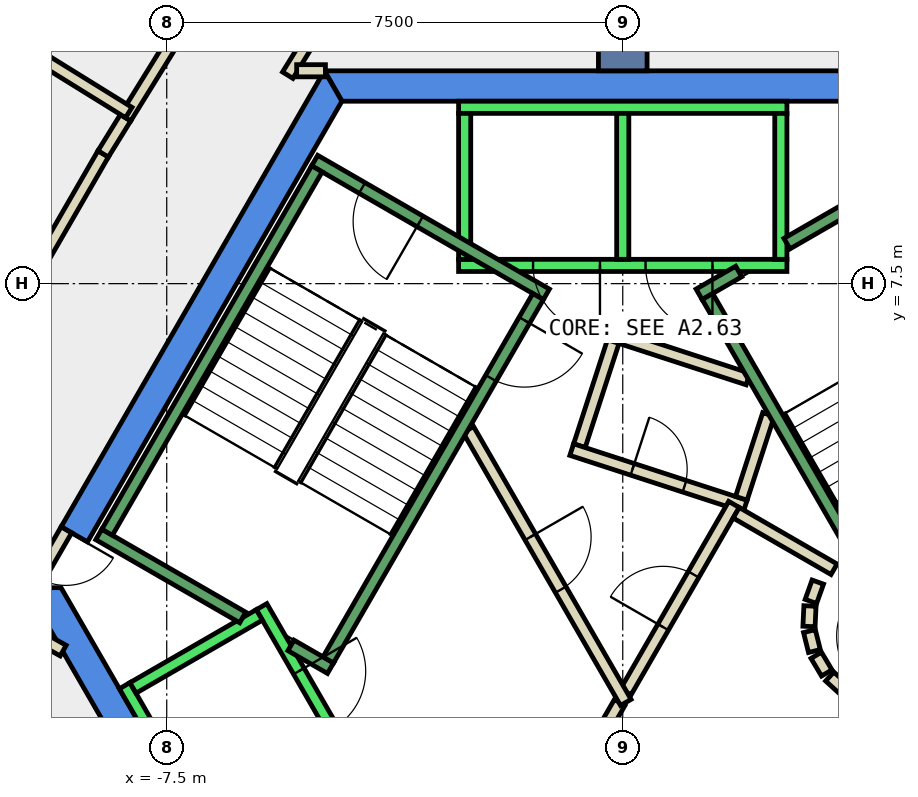
"""IFC4 building model, lengths in metres.
Left out: names, types, materials, properties, quantities, classifications, styles, units other than length and angle.
Written with IfcOpenShell. Run it as: python <this file> out.ifc"""

import sys

from ifc_helpers import new_model, si_unit, direction, frame, frame_2d, origin, place, context, subcontext, project, spatial, polyline, rectangle, outline, extrude, element, fill, save


model = new_model("IFC4")
c1 = context("Model", 3, precision=1e-05, world=origin(), true_north=direction((0.0, 1.0)))
c2 = subcontext(c1, "Body", "Model", "MODEL_VIEW")
j1 = project(units=[si_unit("LENGTHUNIT", "METRE"), si_unit("PLANEANGLEUNIT", "RADIAN")], contexts=[c1])
p1 = place(None, origin())
s1 = spatial("IfcSite", under=j1, at=p1, CompositionType="ELEMENT")
p2 = place(p1, origin())
s2 = spatial("IfcBuilding", under=s1, at=p2, CompositionType="ELEMENT")
p3 = place(p2, frame((0.0, 0.0, 297.2)))
s3 = spatial("IfcBuildingStorey", under=s2, at=p3, CompositionType="ELEMENT", Elevation=297.2)
p4 = place(p3, frame((0.0, 0.0, -0.34)))
e1 = element("IfcWall", 1, at=p4, inside=s3, PredefinedType="SHEAR", context=c2, shape_type="SweptSolid", body=[
    extrude(outline(polyline([(4.907, 11.0), (-4.907, 11.0), (-4.619, 10.5), (4.619, 10.5), (4.907, 11.0)])), origin(), (0.0, 0.0, 1.0), 3.6),
])
p5 = place(p3, frame((0.0, 0.0, -0.34)))
e2 = element("IfcWall", 2, at=p5, inside=s3, PredefinedType="SHEAR", context=c2, shape_type="SweptSolid", body=[
    extrude(outline(polyline([(-9.236, 3.502), (-8.803, 3.253), (-4.619, 10.5), (-4.907, 11.0), (-9.236, 3.502)])), origin(), (0.0, 0.0, 1.0), 3.6),
])
p6 = place(p3, frame((0.0, 0.0, -0.34)))
e3 = element("IfcWall", 3, at=p6, inside=s3, PredefinedType="SHEAR", context=c2, shape_type="SweptSolid", body=[
    extrude(outline(polyline([(-9.815, 2.5), (-4.907, -6.0), (-4.619, -5.5), (-9.238, 2.5), (-9.815, 2.5)])), origin(), (0.0, 0.0, 1.0), 3.6),
])
p7 = place(p3, frame((0.0, 11.0, -0.34), z_axis=(0.0, 0.0, 1.0), x_axis=(0.0, 1.0, 0.0)))
e4 = element("IfcWall", 4, at=p7, inside=s3, PredefinedType="SHEAR", context=c2, shape_type="SweptSolid", body=[
    extrude(rectangle(XDim=9.0, YDim=0.8, at=frame_2d((4.5, 0.0))), origin(), (0.0, 0.0, 1.0), 3.6),
])
p8 = place(p3, frame((2.06, 5.931, 0.0), z_axis=(0.0, 0.0, 1.0), x_axis=(-0.95092855133, 0.309410552932, 0.0)))
e5 = element("IfcWall", 5, at=p8, inside=s3, PredefinedType="PARTITIONING", context=c2, shape_type="SweptSolid", body=[
    extrude(rectangle(XDim=2.399, YDim=0.2, at=frame_2d((1.199, 0.0))), origin(), (0.0, 0.0, 1.0), 3.26),
])
p9 = place(p3, frame((-0.157, 6.547, 0.0), z_axis=(0.0, 0.0, 1.0), x_axis=(-0.308813127339, -0.951122732555, 0.0)))
e6 = element("IfcWall", 6, at=p9, inside=s3, PredefinedType="PARTITIONING", context=c2, shape_type="SweptSolid", body=[
    extrude(rectangle(XDim=1.8, YDim=0.2, at=frame_2d((0.9, 0.0))), origin(), (0.0, 0.0, 1.0), 3.26),
])
p10 = place(p3, frame((-0.839, 4.771, 0.0), z_axis=(0.0, 0.0, 1.0), x_axis=(0.950961084355, -0.309310549515, 0.0)))
e7 = element("IfcWall", 7, at=p10, inside=s3, PredefinedType="PARTITIONING", context=c2, shape_type="SweptSolid", body=[
    extrude(rectangle(XDim=3.0, YDim=0.2, at=frame_2d((1.5, 0.0))), origin(), (0.0, 0.0, 1.0), 3.26),
])
p11 = place(p10, frame((1.05, 0.0, 0.0)))
e8 = element("IfcOpeningElement", 8, at=p11, cuts=e7, PredefinedType="OPENING", context=c2, shape_type="SweptSolid", body=[
    extrude(rectangle(XDim=0.9, YDim=2.1, at=frame_2d((0.45, 1.05))), frame((0.0, 0.11, 0.0), z_axis=(0.0, -1.0, 0.0), x_axis=(1.0, 0.0, 0.0)), (0.0, 0.0, 1.0), 0.22),
])
p12 = place(p3, frame((1.95, 3.97, 0.0), z_axis=(0.0, 0.0, 1.0), x_axis=(0.308583003896, 0.951197418892, 0.0)))
e9 = element("IfcWall", 9, at=p12, inside=s3, PredefinedType="PARTITIONING", context=c2, shape_type="SweptSolid", body=[
    extrude(rectangle(XDim=1.449, YDim=0.2, at=frame_2d((0.724, 0.0))), origin(), (0.0, 0.0, 1.0), 3.26),
])
p13 = place(p3, frame((-2.969, 15.033, 0.0), z_axis=(0.0, 0.0, 1.0), x_axis=(-0.526330241425, -0.85028023437, 0.0)))
e10 = element("IfcWall", 10, at=p13, inside=s3, PredefinedType="PARTITIONING", context=c2, shape_type="SweptSolid", body=[
    extrude(rectangle(XDim=4.828, YDim=0.2, at=frame_2d((2.414, 0.0))), origin(), (0.0, 0.0, 1.0), 3.26),
])
p14 = place(p13, frame((1.514, 0.0, 0.0)))
e11 = element("IfcOpeningElement", 11, at=p14, cuts=e10, PredefinedType="OPENING", context=c2, shape_type="SweptSolid", body=[
    extrude(rectangle(XDim=1.8, YDim=2.1, at=frame_2d((0.9, 1.05))), frame((0.0, 0.11, 0.0), z_axis=(0.0, -1.0, 0.0), x_axis=(1.0, 0.0, 0.0)), (0.0, 0.0, 1.0), 0.22),
])
p15 = place(p3, frame((-5.363, 11.001, 0.0), z_axis=(0.0, 0.0, 1.0), x_axis=(1.0, 0.0, 0.0)))
e12 = element("IfcWall", 12, at=p15, inside=s3, PredefinedType="PARTITIONING", context=c2, shape_type="SweptSolid", body=[
    extrude(rectangle(XDim=0.473, YDim=0.2, at=frame_2d((0.237, 0.0))), origin(), (0.0, 0.0, 1.0), 3.26),
])
p16 = place(p3, frame((-9.203, 1.465, 0.0), z_axis=(0.0, 0.0, 1.0), x_axis=(-0.872243753731, 0.489071399775, 0.0)))
e13 = element("IfcWall", 13, at=p16, inside=s3, PredefinedType="PARTITIONING", context=c2, shape_type="SweptSolid", body=[
    extrude(rectangle(XDim=1.715, YDim=0.2, at=frame_2d((0.858, 0.0))), origin(), (0.0, 0.0, 1.0), 3.26),
])
p17 = place(p3, frame((-10.543, 6.174, 0.0), z_axis=(0.0, 0.0, 1.0), x_axis=(0.50008212199, 0.86597798544, 0.0)))
e14 = element("IfcWall", 14, at=p17, inside=s3, PredefinedType="PARTITIONING", context=c2, shape_type="SweptSolid", body=[
    extrude(rectangle(XDim=3.995, YDim=0.2, at=frame_2d((1.998, 0.0))), origin(), (0.0, 0.0, 1.0), 3.26),
])
p18 = place(p3, frame((-8.545, 9.634, 0.0), z_axis=(0.0, 0.0, 1.0), x_axis=(0.52594604986, 0.85051793199, 0.0)))
e15 = element("IfcWall", 15, at=p18, inside=s3, PredefinedType="PARTITIONING", context=c2, shape_type="SweptSolid", body=[
    extrude(rectangle(XDim=0.699, YDim=0.2, at=frame_2d((0.35, 0.0))), origin(), (0.0, 0.0, 1.0), 3.26),
])
p19 = place(p3, frame((-8.177, 10.229, 0.0), z_axis=(0.0, 0.0, 1.0), x_axis=(0.526504295939, 0.850172468595, 0.0)))
e16 = element("IfcWall", 16, at=p19, inside=s3, PredefinedType="PARTITIONING", context=c2, shape_type="SweptSolid", body=[
    extrude(rectangle(XDim=3.2, YDim=0.2, at=frame_2d((1.6, 0.0))), origin(), (0.0, 0.0, 1.0), 3.26),
])
p20 = place(p3, frame((-0.982, -1.0, 0.0), z_axis=(0.0, 0.0, 1.0), x_axis=(0.50024047865, 0.865886518847, 0.0)))
e17 = element("IfcWall", 17, at=p20, inside=s3, PredefinedType="PARTITIONING", context=c2, shape_type="SweptSolid", body=[
    extrude(rectangle(XDim=1.863, YDim=0.2, at=frame_2d((0.931, 0.0))), origin(), (0.0, 0.0, 1.0), 3.26),
])
p21 = place(p3, frame((0.05, 0.787, 0.0), z_axis=(0.0, 0.0, 1.0), x_axis=(0.499954076797, 0.866051915934, 0.0)))
e18 = element("IfcWall", 18, at=p21, inside=s3, PredefinedType="PARTITIONING", context=c2, shape_type="SweptSolid", body=[
    extrude(rectangle(XDim=3.558, YDim=0.2, at=frame_2d((1.779, 0.0))), origin(), (0.0, 0.0, 1.0), 3.26),
])
p22 = place(p21, frame((1.229, 0.0, 0.0)))
e19 = element("IfcOpeningElement", 19, at=p22, cuts=e18, PredefinedType="OPENING", context=c2, shape_type="SweptSolid", body=[
    extrude(rectangle(XDim=1.0, YDim=2.1, at=frame_2d((0.5, 1.05))), frame((0.0, 0.11, 0.0), z_axis=(0.0, -1.0, 0.0), x_axis=(1.0, 0.0, 0.0)), (0.0, 0.0, 1.0), 0.22),
])
p23 = place(p3, frame((1.866, 3.732, 0.0), z_axis=(0.0, 0.0, 1.0), x_axis=(0.866043361281, -0.499968895414, 0.0)))
e20 = element("IfcWall", 20, at=p23, inside=s3, PredefinedType="PARTITIONING", context=c2, shape_type="SweptSolid", body=[
    extrude(rectangle(XDim=1.858, YDim=0.2, at=frame_2d((0.929, 0.0))), origin(), (0.0, 0.0, 1.0), 3.26),
])
p24 = place(p3, frame((3.208, 2.592, 0.0), z_axis=(0.0, 0.0, 1.0), x_axis=(-0.337388820924, -0.941365382578, 0.0)))
e21 = element("IfcWall", 21, at=p24, inside=s3, PredefinedType="PARTITIONING", context=c2, shape_type="SweptSolid", body=[
    extrude(rectangle(XDim=0.338, YDim=0.2, at=frame_2d((0.169, 0.0))), origin(), (0.0, 0.0, 1.0), 3.26),
])
p25 = place(p3, frame((3.079, 2.199, 0.0), z_axis=(0.0, 0.0, 1.0), x_axis=(-0.047771483479, -0.998858290933, 0.0)))
e22 = element("IfcWall", 22, at=p25, inside=s3, PredefinedType="PARTITIONING", context=c2, shape_type="SweptSolid", body=[
    extrude(rectangle(XDim=0.337, YDim=0.2, at=frame_2d((0.169, 0.0))), origin(), (0.0, 0.0, 1.0), 3.26),
])
p26 = place(p3, frame((3.07, 1.786, 0.0), z_axis=(0.0, 0.0, 1.0), x_axis=(0.242705583207, -0.970099994784, 0.0)))
e23 = element("IfcWall", 23, at=p26, inside=s3, PredefinedType="PARTITIONING", context=c2, shape_type="SweptSolid", body=[
    extrude(rectangle(XDim=0.338, YDim=0.2, at=frame_2d((0.169, 0.0))), origin(), (0.0, 0.0, 1.0), 3.26),
])
for number, where, z_axis, x_axis in (
    (24, (3.182, 1.388, 0.0), (0.0, 0.0, 1.0), (0.512, -0.859, 0.0)),
    (25, (3.404, 1.039, 0.0), (0.0, 0.0, 1.0), (0.74, -0.672, 0.0)),
):
    element("IfcWall", number, at=place(p3, frame(where, z_axis=z_axis, x_axis=x_axis)), inside=s3, PredefinedType="PARTITIONING", context=c2, shape_type="SweptSolid", body=[
        extrude(rectangle(XDim=0.338, YDim=0.2, at=frame_2d((0.169, 0.0))), origin(), (0.0, 0.0, 1.0), 3.26),
    ])
p27 = place(p3, frame((-2.54, 5.1, 0.0), z_axis=(0.0, 0.0, 1.0), x_axis=(0.499925051871, -0.866068670783, 0.0)))
e26 = element("IfcWall", 26, at=p27, inside=s3, PredefinedType="PARTITIONING", context=c2, shape_type="SweptSolid", body=[
    extrude(rectangle(XDim=5.181, YDim=0.2, at=frame_2d((2.59, 0.0))), origin(), (0.0, 0.0, 1.0), 3.26),
])
p28 = place(p27, frame((2.04, 0.0, 0.0)))
e27 = element("IfcOpeningElement", 27, at=p28, cuts=e26, PredefinedType="OPENING", context=c2, shape_type="SweptSolid", body=[
    extrude(rectangle(XDim=1.0, YDim=2.1, at=frame_2d((0.5, 1.05))), frame((0.0, 0.11, 0.0), z_axis=(0.0, -1.0, 0.0), x_axis=(1.0, 0.0, 0.0)), (0.0, 0.0, 1.0), 0.22),
])
p29 = place(p3, frame((-10.42, 11.736, 0.0), z_axis=(0.0, 0.0, 1.0), x_axis=(0.850124477172, -0.52658178217, 0.0)))
e28 = element("IfcWall", 28, at=p29, inside=s3, PredefinedType="PARTITIONING", context=c2, shape_type="SweptSolid", body=[
    extrude(rectangle(XDim=2.701, YDim=0.2, at=frame_2d((1.35, 0.0))), origin(), (0.0, 0.0, 1.0), 3.26),
])
p30 = place(p3, frame((-9.15, 3.452, 0.0), z_axis=(0.0, 0.0, 1.0), x_axis=(-0.500079945886, -0.865979242085, 0.0)))
e29 = element("IfcWall", 29, at=p30, inside=s3, PredefinedType="PARTITIONING", context=c2, shape_type="SweptSolid", body=[
    extrude(rectangle(XDim=0.926, YDim=0.2, at=frame_2d((0.463, 0.0))), origin(), (0.0, 0.0, 1.0), 2.4),
])
p31 = place(p30, frame((0.017, 0.0, 0.0)))
e30 = element("IfcOpeningElement", 30, at=p31, cuts=e29, PredefinedType="OPENING", context=c2, shape_type="SweptSolid", body=[
    extrude(rectangle(XDim=0.9, YDim=2.1, at=frame_2d((0.45, 1.05))), frame((0.0, 0.11, 0.0), z_axis=(0.0, -1.0, 0.0), x_axis=(1.0, 0.0, 0.0)), (0.0, 0.0, 1.0), 0.22),
])
p32 = place(p3, frame((4.822, 11.156, 0.0), z_axis=(0.0, 0.0, 1.0), x_axis=(-0.429057973289, 0.903276953961, 0.0)))
e31 = element("IfcWall", 31, at=p32, inside=s3, PredefinedType="PARTITIONING", context=c2, shape_type="SweptSolid", body=[
    extrude(rectangle(XDim=4.298, YDim=0.2, at=frame_2d((2.149, 0.0))), origin(), (0.0, 0.0, 1.0), 3.26),
])
p33 = place(p3, frame((2.7, 7.8, 0.0), z_axis=(0.0, 0.0, 1.0), x_axis=(-1.0, 0.0, 0.0)))
e32 = element("IfcWall", 32, at=p33, inside=s3, PredefinedType="STANDARD", context=c2, shape_type="SweptSolid", body=[
    extrude(rectangle(XDim=5.4, YDim=0.2, at=frame_2d((2.7, 0.0))), origin(), (0.0, 0.0, 1.0), 3.26),
])
p34 = place(p33, frame((1.225, 0.0, 0.0)))
e33 = element("IfcOpeningElement", 33, at=p34, cuts=e32, PredefinedType="OPENING", context=c2, shape_type="SweptSolid", body=[
    extrude(rectangle(XDim=1.1, YDim=2.1, at=frame_2d((0.55, 1.05))), frame((0.0, 0.11, 0.0), z_axis=(0.0, -1.0, 0.0), x_axis=(1.0, 0.0, 0.0)), (0.0, 0.0, 1.0), 0.22),
])
p35 = place(p33, frame((3.075, 0.0, 0.0)))
e34 = element("IfcOpeningElement", 34, at=p35, cuts=e32, PredefinedType="OPENING", context=c2, shape_type="SweptSolid", body=[
    extrude(rectangle(XDim=1.1, YDim=2.1, at=frame_2d((0.55, 1.05))), frame((0.0, 0.11, 0.0), z_axis=(0.0, -1.0, 0.0), x_axis=(1.0, 0.0, 0.0)), (0.0, 0.0, 1.0), 0.22),
])
p36 = place(p3, frame((2.7, 10.4, 0.0), z_axis=(0.0, 0.0, 1.0), x_axis=(-1.0, 0.0, 0.0)))
e35 = element("IfcWall", 35, at=p36, inside=s3, PredefinedType="STANDARD", context=c2, shape_type="SweptSolid", body=[
    extrude(rectangle(XDim=5.4, YDim=0.2, at=frame_2d((2.7, 0.0))), origin(), (0.0, 0.0, 1.0), 3.26),
])
for number, where, z_axis, x_axis in (
    (36, (2.6, 7.9, 0.0), (0.0, 0.0, 1.0), (0.0, 1.0, 0.0)),
    (37, (0.0, 7.9, 0.0), (0.0, 0.0, 1.0), (0.0, 1.0, 0.0)),
    (38, (-2.6, 7.9, 0.0), (0.0, 0.0, 1.0), (0.0, 1.0, 0.0)),
):
    element("IfcWall", number, at=place(p3, frame(where, z_axis=z_axis, x_axis=x_axis)), inside=s3, PredefinedType="STANDARD", context=c2, shape_type="SweptSolid", body=[
        extrude(rectangle(XDim=2.4, YDim=0.2, at=frame_2d((1.2, 0.0))), origin(), (0.0, 0.0, 1.0), 3.26),
    ])
p37 = place(p3, frame((-5.94, 2.188, 0.0), z_axis=(0.0, 0.0, 1.0), x_axis=(0.500034260056, -0.866005622828, 0.0)))
e39 = element("IfcWall", 39, at=p37, inside=s3, PredefinedType="STANDARD", context=c2, shape_type="SweptSolid", body=[
    extrude(rectangle(XDim=5.399, YDim=0.2, at=frame_2d((2.7, 0.0))), origin(), (0.0, 0.0, 1.0), 3.26),
])
p38 = place(p37, frame((3.075, 0.0, 0.0)))
e40 = element("IfcOpeningElement", 40, at=p38, cuts=e39, PredefinedType="OPENING", context=c2, shape_type="SweptSolid", body=[
    extrude(rectangle(XDim=1.1, YDim=2.1, at=frame_2d((0.55, 1.05))), frame((0.0, 0.11, 0.0), z_axis=(0.0, -1.0, 0.0), x_axis=(1.0, 0.0, 0.0)), (0.0, 0.0, 1.0), 0.22),
])
p39 = place(p37, frame((1.225, 0.0, 0.0)))
e41 = element("IfcOpeningElement", 41, at=p39, cuts=e39, PredefinedType="OPENING", context=c2, shape_type="SweptSolid", body=[
    extrude(rectangle(XDim=1.1, YDim=2.1, at=frame_2d((0.55, 1.05))), frame((0.0, 0.11, 0.0), z_axis=(0.0, -1.0, 0.0), x_axis=(1.0, 0.0, 0.0)), (0.0, 0.0, 1.0), 0.22),
])
p40 = place(p3, frame((-8.192, 0.888, 0.0), z_axis=(0.0, 0.0, 1.0), x_axis=(0.500034260056, -0.866005622828, 0.0)))
e42 = element("IfcWall", 42, at=p40, inside=s3, PredefinedType="STANDARD", context=c2, shape_type="SweptSolid", body=[
    extrude(rectangle(XDim=5.399, YDim=0.2, at=frame_2d((2.7, 0.0))), origin(), (0.0, 0.0, 1.0), 3.26),
])
p41 = place(p3, frame((-5.977, 2.052, 0.0), z_axis=(0.0, 0.0, 1.0), x_axis=(-0.865973769406, -0.500089422704, 0.0)))
e43 = element("IfcWall", 43, at=p41, inside=s3, PredefinedType="STANDARD", context=c2, shape_type="SweptSolid", body=[
    extrude(rectangle(XDim=2.399, YDim=0.2, at=frame_2d((1.2, 0.0))), origin(), (0.0, 0.0, 1.0), 3.26),
])
p42 = place(p3, frame((3.24, -2.488, 0.0), z_axis=(0.0, 0.0, 1.0), x_axis=(0.500034260056, 0.866005622828, 0.0)))
e44 = element("IfcWall", 44, at=p42, inside=s3, PredefinedType="STANDARD", context=c2, shape_type="SweptSolid", body=[
    extrude(rectangle(XDim=5.399, YDim=0.2, at=frame_2d((2.7, 0.0))), origin(), (0.0, 0.0, 1.0), 3.26),
])
p43 = place(p42, frame((3.225, 0.0, 0.0)))
e45 = element("IfcOpeningElement", 45, at=p43, cuts=e44, PredefinedType="OPENING", context=c2, shape_type="SweptSolid", body=[
    extrude(rectangle(XDim=1.1, YDim=2.1, at=frame_2d((0.55, 1.05))), frame((0.0, 0.11, 0.0), z_axis=(0.0, -1.0, 0.0), x_axis=(1.0, 0.0, 0.0)), (0.0, 0.0, 1.0), 0.22),
])
p44 = place(p42, frame((1.225, 0.0, 0.0)))
e46 = element("IfcOpeningElement", 46, at=p44, cuts=e44, PredefinedType="OPENING", context=c2, shape_type="SweptSolid", body=[
    extrude(rectangle(XDim=1.1, YDim=2.1, at=frame_2d((0.55, 1.05))), frame((0.0, 0.11, 0.0), z_axis=(0.0, -1.0, 0.0), x_axis=(1.0, 0.0, 0.0)), (0.0, 0.0, 1.0), 0.22),
])
p45 = place(p3, frame((2.7, 8.158, 0.0), z_axis=(0.0, 0.0, 1.0), x_axis=(0.86611865017, 0.499838457731, 0.0)))
e47 = element("IfcWall", 47, at=p45, inside=s3, PredefinedType="STANDARD", context=c2, shape_type="SweptSolid", body=[
    extrude(rectangle(XDim=2.733, YDim=0.2, at=frame_2d((1.366, 0.0))), origin(), (0.0, 0.0, 1.0), 3.26),
])
p46 = place(p3, frame((1.256, 7.324, 0.0), z_axis=(0.0, 0.0, 1.0), x_axis=(0.865915093549, 0.500191014278, 0.0)))
e48 = element("IfcWall", 48, at=p46, inside=s3, PredefinedType="STANDARD", context=c2, shape_type="SweptSolid", body=[
    extrude(rectangle(XDim=0.752, YDim=0.2, at=frame_2d((0.376, 0.0))), origin(), (0.0, 0.0, 1.0), 3.26),
])
p47 = place(p3, frame((4.843, 1.312, 0.0), z_axis=(0.0, 0.0, 1.0), x_axis=(-0.499963383562, 0.866046543262, 0.0)))
e49 = element("IfcWall", 49, at=p47, inside=s3, PredefinedType="STANDARD", context=c2, shape_type="SweptSolid", body=[
    extrude(rectangle(XDim=6.9, YDim=0.2, at=frame_2d((3.45, 0.0))), origin(), (0.0, 0.0, 1.0), 3.26),
])
p48 = place(p47, frame((0.45, 0.0, 0.0)))
e50 = element("IfcOpeningElement", 50, at=p48, cuts=e49, PredefinedType="OPENING", context=c2, shape_type="SweptSolid", body=[
    extrude(rectangle(XDim=1.1, YDim=2.2, at=frame_2d((0.55, 1.1))), frame((0.0, 0.11, 0.0), z_axis=(0.0, -1.0, 0.0), x_axis=(1.0, 0.0, 0.0)), (0.0, 0.0, 1.0), 0.22),
])
p49 = place(p3, frame((-1.256, 7.324, 0.0), z_axis=(0.0, 0.0, 1.0), x_axis=(-0.866046073146, 0.499964197906, 0.0)))
e51 = element("IfcWall", 51, at=p49, inside=s3, PredefinedType="STANDARD", context=c2, shape_type="SweptSolid", body=[
    extrude(rectangle(XDim=4.4, YDim=0.2, at=frame_2d((2.2, 0.0))), origin(), (0.0, 0.0, 1.0), 3.26),
])
p50 = place(p49, frame((2.4, 0.0, 0.0)))
e52 = element("IfcOpeningElement", 52, at=p50, cuts=e51, PredefinedType="OPENING", context=c2, shape_type="SweptSolid", body=[
    extrude(rectangle(XDim=1.1, YDim=2.2, at=frame_2d((0.55, 1.1))), frame((0.0, 0.11, 0.0), z_axis=(0.0, -1.0, 0.0), x_axis=(1.0, 0.0, 0.0)), (0.0, 0.0, 1.0), 0.22),
])
p51 = place(p3, frame((-6.25, 2.01, 0.0), z_axis=(0.0, 0.0, 1.0), x_axis=(-0.86611865017, 0.499838457731, 0.0)))
e53 = element("IfcWall", 53, at=p51, inside=s3, PredefinedType="STANDARD", context=c2, shape_type="SweptSolid", body=[
    extrude(rectangle(XDim=2.733, YDim=0.2, at=frame_2d((1.366, 0.0))), origin(), (0.0, 0.0, 1.0), 3.26),
])
p52 = place(p3, frame((-4.806, 1.176, 0.0), z_axis=(0.0, 0.0, 1.0), x_axis=(-0.866558586415, 0.499075361355, 0.0)))
e54 = element("IfcWall", 54, at=p52, inside=s3, PredefinedType="STANDARD", context=c2, shape_type="SweptSolid", body=[
    extrude(rectangle(XDim=0.751, YDim=0.2, at=frame_2d((0.376, 0.0))), origin(), (0.0, 0.0, 1.0), 3.26),
])
p53 = place(p3, frame((-1.393, 7.288, 0.0), z_axis=(0.0, 0.0, 1.0), x_axis=(-0.499963383562, -0.866046543262, 0.0)))
e55 = element("IfcWall", 55, at=p53, inside=s3, PredefinedType="STANDARD", context=c2, shape_type="SweptSolid", body=[
    extrude(rectangle(XDim=6.9, YDim=0.2, at=frame_2d((3.45, 0.0))), origin(), (0.0, 0.0, 1.0), 3.26),
])
p54 = place(p53, frame((0.45, 0.0, 0.0)))
e56 = element("IfcOpeningElement", 56, at=p54, cuts=e55, PredefinedType="OPENING", context=c2, shape_type="SweptSolid", body=[
    extrude(rectangle(XDim=1.1, YDim=2.2, at=frame_2d((0.55, 1.1))), frame((0.0, 0.11, 0.0), z_axis=(0.0, -1.0, 0.0), x_axis=(1.0, 0.0, 0.0)), (0.0, 0.0, 1.0), 0.22),
])
p55 = place(p3, frame((-5.03, 9.388, 0.0), z_axis=(0.0, 0.0, 1.0), x_axis=(-0.499978703459, -0.866037698999, 0.0)))
e57 = element("IfcWall", 57, at=p55, inside=s3, PredefinedType="STANDARD", context=c2, shape_type="SweptSolid", body=[
    extrude(rectangle(XDim=6.9, YDim=0.2, at=frame_2d((3.45, 0.0))), origin(), (0.0, 0.0, 1.0), 3.26),
])
p56 = place(p22, origin())
e58 = element("IfcDoor", 58, at=p56, inside=s3, OperationType="SINGLE_SWING_RIGHT", PredefinedType="DOOR", context=c2, shape_type="SweptSolid", body=[
    extrude(rectangle(XDim=1.0, YDim=2.1, at=frame_2d((0.5, 1.05))), frame((0.0, 0.025, 0.0), z_axis=(0.0, -1.0, 0.0), x_axis=(1.0, 0.0, 0.0)), (0.0, 0.0, 1.0), 0.05),
])
fill(e19, e58)
p57 = place(p28, origin())
e59 = element("IfcDoor", 59, at=p57, inside=s3, OperationType="SINGLE_SWING_RIGHT", PredefinedType="DOOR", context=c2, shape_type="SweptSolid", body=[
    extrude(rectangle(XDim=1.0, YDim=2.1, at=frame_2d((0.5, 1.05))), frame((0.0, 0.025, 0.0), z_axis=(0.0, -1.0, 0.0), x_axis=(1.0, 0.0, 0.0)), (0.0, 0.0, 1.0), 0.05),
])
fill(e27, e59)
p58 = place(p11, origin())
e60 = element("IfcDoor", 60, at=p58, inside=s3, OperationType="SINGLE_SWING_LEFT", PredefinedType="DOOR", context=c2, shape_type="SweptSolid", body=[
    extrude(rectangle(XDim=0.9, YDim=2.1, at=frame_2d((0.45, 1.05))), frame((0.0, 0.025, 0.0), z_axis=(0.0, -1.0, 0.0), x_axis=(1.0, 0.0, 0.0)), (0.0, 0.0, 1.0), 0.05),
])
fill(e8, e60)
p59 = place(p31, origin())
e61 = element("IfcDoor", 61, at=p59, inside=s3, OperationType="SINGLE_SWING_LEFT", PredefinedType="DOOR", context=c2, shape_type="SweptSolid", body=[
    extrude(rectangle(XDim=0.9, YDim=2.1, at=frame_2d((0.45, 1.05))), frame((0.0, 0.025, 0.0), z_axis=(0.0, -1.0, 0.0), x_axis=(1.0, 0.0, 0.0)), (0.0, 0.0, 1.0), 0.05),
])
fill(e30, e61)
p60 = place(p34, origin())
e62 = element("IfcDoor", 62, at=p60, inside=s3, OperationType="SLIDING_TO_LEFT", PredefinedType="DOOR", context=c2, shape_type="SweptSolid", body=[
    extrude(rectangle(XDim=1.1, YDim=2.1, at=frame_2d((0.55, 1.05))), frame((0.0, 0.025, 0.0), z_axis=(0.0, -1.0, 0.0), x_axis=(1.0, 0.0, 0.0)), (0.0, 0.0, 1.0), 0.05),
])
fill(e33, e62)
p61 = place(p35, origin())
e63 = element("IfcDoor", 63, at=p61, inside=s3, OperationType="SLIDING_TO_LEFT", PredefinedType="DOOR", context=c2, shape_type="SweptSolid", body=[
    extrude(rectangle(XDim=1.1, YDim=2.1, at=frame_2d((0.55, 1.05))), frame((0.0, 0.025, 0.0), z_axis=(0.0, -1.0, 0.0), x_axis=(1.0, 0.0, 0.0)), (0.0, 0.0, 1.0), 0.05),
])
fill(e34, e63)
p62 = place(p39, origin())
e64 = element("IfcDoor", 64, at=p62, inside=s3, OperationType="SLIDING_TO_LEFT", PredefinedType="DOOR", context=c2, shape_type="SweptSolid", body=[
    extrude(rectangle(XDim=1.1, YDim=2.1, at=frame_2d((0.55, 1.05))), frame((0.0, 0.025, 0.0), z_axis=(0.0, -1.0, 0.0), x_axis=(1.0, 0.0, 0.0)), (0.0, 0.0, 1.0), 0.05),
])
fill(e41, e64)
p63 = place(p54, origin())
e65 = element("IfcDoor", 65, at=p63, inside=s3, OperationType="SINGLE_SWING_LEFT", PredefinedType="DOOR", context=c2, shape_type="SweptSolid", body=[
    extrude(rectangle(XDim=1.1, YDim=2.2, at=frame_2d((0.55, 1.1))), frame((0.0, 0.025, 0.0), z_axis=(0.0, -1.0, 0.0), x_axis=(1.0, 0.0, 0.0)), (0.0, 0.0, 1.0), 0.05),
])
fill(e56, e65)
p64 = place(p50, origin())
e66 = element("IfcDoor", 66, at=p64, inside=s3, OperationType="SINGLE_SWING_LEFT", PredefinedType="DOOR", context=c2, shape_type="SweptSolid", body=[
    extrude(rectangle(XDim=1.1, YDim=2.2, at=frame_2d((0.55, 1.1))), frame((0.0, 0.025, 0.0), z_axis=(0.0, -1.0, 0.0), x_axis=(1.0, 0.0, 0.0)), (0.0, 0.0, 1.0), 0.05),
])
fill(e52, e66)
save(model, sys.argv[1])
